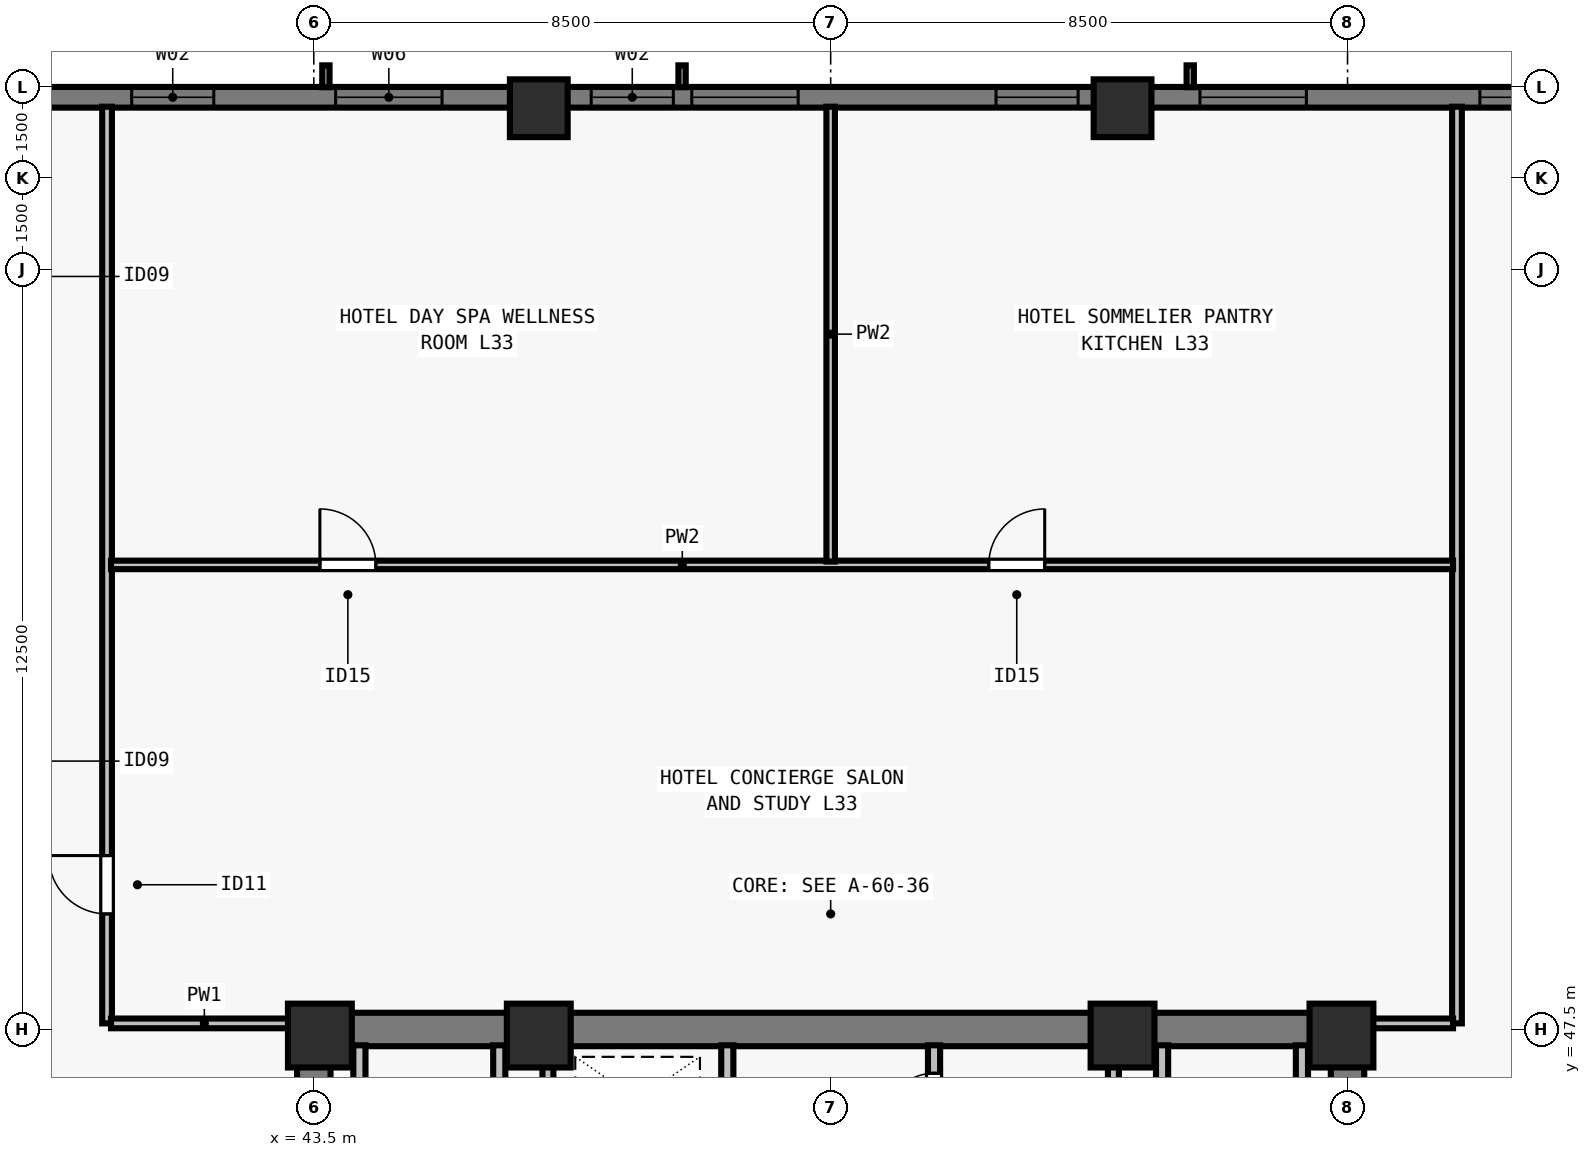
"""IFC4 building model, lengths in metres.
Left out: names, types, materials, properties, quantities, classifications, styles, units other than length and angle.
Written with IfcOpenShell. Run it as: python <this file> out.ifc"""

import sys

from ifc_helpers import new_model, si_unit, direction, frame, frame_2d, origin, origin_2d, place, context, subcontext, project, spatial, rectangle, extrude, element, fill, save


model = new_model("IFC4")
c1 = context("Model", 3, precision=1e-05, world=origin(), true_north=direction((0.0, 1.0)))
c2 = subcontext(c1, "Body", "Model", "MODEL_VIEW")
j1 = project(units=[si_unit("LENGTHUNIT", "METRE"), si_unit("PLANEANGLEUNIT", "RADIAN")], contexts=[c1])
p1 = place(None, origin())
s1 = spatial("IfcSite", under=j1, at=p1, CompositionType="ELEMENT")
p2 = place(p1, origin())
s2 = spatial("IfcBuilding", under=s1, at=p2, CompositionType="ELEMENT")
p3 = place(p2, frame((0.0, 0.0, 123.5)))
s3 = spatial("IfcBuildingStorey", under=s2, at=p3, CompositionType="ELEMENT", Elevation=123.5)
for number, where, z_axis, x_axis in (
    (1, (43.6, 47.4, 0.0), (0.0, 0.0, 1.0), (1.0, 0.0, 0.0)),
    (2, (47.2, 47.4, 0.0), (0.0, 0.0, 1.0), (1.0, 0.0, 0.0)),
    (3, (56.8, 47.4, 0.0), (0.0, 0.0, 1.0), (1.0, 0.0, 0.0)),
    (4, (60.4, 47.4, 0.0), (0.0, 0.0, 1.0), (1.0, 0.0, 0.0)),
):
    element("IfcColumn", number, at=place(p3, frame(where, z_axis=z_axis, x_axis=x_axis)), inside=s3, PredefinedType="COLUMN", context=c2, shape_type="SweptSolid", body=[
        extrude(rectangle(XDim=1.05, YDim=1.05, at=origin_2d()), origin(), (0.0, 0.0, 1.0), 3.5),
    ])
for number, where, z_axis, x_axis in (
    (5, (56.8, 62.65, 0.0), (0.0, 0.0, 1.0), (1.0, 0.0, 0.0)),
    (6, (47.2, 62.65, 0.0), (0.0, 0.0, 1.0), (1.0, 0.0, 0.0)),
):
    element("IfcColumn", number, at=place(p3, frame(where, z_axis=z_axis, x_axis=x_axis)), inside=s3, PredefinedType="COLUMN", context=c2, shape_type="SweptSolid", body=[
        extrude(rectangle(XDim=0.95, YDim=0.95, at=origin_2d()), origin(), (0.0, 0.0, 1.0), 3.5),
    ])
p4 = place(p3, frame((32.0, 62.83, 0.0), z_axis=(0.0, 0.0, 1.0), x_axis=(1.0, 0.0, 0.0)))
e7 = element("IfcWall", 7, at=p4, inside=s3, PredefinedType="SOLIDWALL", context=c2, shape_type="SweptSolid", body=[
    extrude(rectangle(XDim=39.682, YDim=0.34, at=frame_2d((19.841, 0.0))), origin(), (0.0, 0.0, 1.0), 3.28),
])
p5 = place(p4, frame((3.902, 0.0, 0.8)))
e8 = element("IfcOpeningElement", 8, at=p5, cuts=e7, PredefinedType="OPENING", context=c2, shape_type="SweptSolid", body=[
    extrude(rectangle(XDim=1.75, YDim=1.66, at=frame_2d((0.875, 0.83))), frame((0.0, 0.18, 0.0), z_axis=(0.0, -1.0, 0.0), x_axis=(1.0, 0.0, 0.0)), (0.0, 0.0, 1.0), 0.36),
])
p6 = place(p4, frame((8.505, 0.0, 0.8)))
e9 = element("IfcOpeningElement", 9, at=p6, cuts=e7, PredefinedType="OPENING", context=c2, shape_type="SweptSolid", body=[
    extrude(rectangle(XDim=1.35, YDim=1.66, at=frame_2d((0.675, 0.83))), frame((0.0, 0.18, 0.0), z_axis=(0.0, -1.0, 0.0), x_axis=(1.0, 0.0, 0.0)), (0.0, 0.0, 1.0), 0.36),
])
p7 = place(p4, frame((11.859, 0.0, 0.8)))
e10 = element("IfcOpeningElement", 10, at=p7, cuts=e7, PredefinedType="OPENING", context=c2, shape_type="SweptSolid", body=[
    extrude(rectangle(XDim=1.75, YDim=1.66, at=frame_2d((0.875, 0.83))), frame((0.0, 0.18, 0.0), z_axis=(0.0, -1.0, 0.0), x_axis=(1.0, 0.0, 0.0)), (0.0, 0.0, 1.0), 0.36),
])
p8 = place(p4, frame((16.062, 0.0, 0.8)))
e11 = element("IfcOpeningElement", 11, at=p8, cuts=e7, PredefinedType="OPENING", context=c2, shape_type="SweptSolid", body=[
    extrude(rectangle(XDim=1.35, YDim=1.66, at=frame_2d((0.675, 0.83))), frame((0.0, 0.18, 0.0), z_axis=(0.0, -1.0, 0.0), x_axis=(1.0, 0.0, 0.0)), (0.0, 0.0, 1.0), 0.36),
])
p9 = place(p4, frame((17.716, 0.0, 0.8)))
e12 = element("IfcOpeningElement", 12, at=p9, cuts=e7, PredefinedType="OPENING", context=c2, shape_type="SweptSolid", body=[
    extrude(rectangle(XDim=1.75, YDim=1.66, at=frame_2d((0.875, 0.83))), frame((0.0, 0.18, 0.0), z_axis=(0.0, -1.0, 0.0), x_axis=(1.0, 0.0, 0.0)), (0.0, 0.0, 1.0), 0.36),
])
p10 = place(p4, frame((22.719, 0.0, 0.8)))
e13 = element("IfcOpeningElement", 13, at=p10, cuts=e7, PredefinedType="OPENING", context=c2, shape_type="SweptSolid", body=[
    extrude(rectangle(XDim=1.35, YDim=1.66, at=frame_2d((0.675, 0.83))), frame((0.0, 0.18, 0.0), z_axis=(0.0, -1.0, 0.0), x_axis=(1.0, 0.0, 0.0)), (0.0, 0.0, 1.0), 0.36),
])
p11 = place(p4, frame((26.073, 0.0, 0.8)))
e14 = element("IfcOpeningElement", 14, at=p11, cuts=e7, PredefinedType="OPENING", context=c2, shape_type="SweptSolid", body=[
    extrude(rectangle(XDim=1.75, YDim=1.66, at=frame_2d((0.875, 0.83))), frame((0.0, 0.18, 0.0), z_axis=(0.0, -1.0, 0.0), x_axis=(1.0, 0.0, 0.0)), (0.0, 0.0, 1.0), 0.36),
])
p12 = place(p4, frame((30.677, 0.0, 0.8)))
e15 = element("IfcOpeningElement", 15, at=p12, cuts=e7, PredefinedType="OPENING", context=c2, shape_type="SweptSolid", body=[
    extrude(rectangle(XDim=1.35, YDim=1.66, at=frame_2d((0.675, 0.83))), frame((0.0, 0.18, 0.0), z_axis=(0.0, -1.0, 0.0), x_axis=(1.0, 0.0, 0.0)), (0.0, 0.0, 1.0), 0.36),
])
p13 = place(p4, frame((33.18, 0.0, 0.8)))
e16 = element("IfcOpeningElement", 16, at=p13, cuts=e7, PredefinedType="OPENING", context=c2, shape_type="SweptSolid", body=[
    extrude(rectangle(XDim=1.75, YDim=1.66, at=frame_2d((0.875, 0.83))), frame((0.0, 0.18, 0.0), z_axis=(0.0, -1.0, 0.0), x_axis=(1.0, 0.0, 0.0)), (0.0, 0.0, 1.0), 0.36),
])
p14 = place(p3, frame((43.225, 47.5, 0.0), z_axis=(0.0, 0.0, 1.0), x_axis=(1.0, 0.0, 0.0)))
e17 = element("IfcWall", 17, at=p14, inside=s3, PredefinedType="SHEAR", context=c2, shape_type="SweptSolid", body=[
    extrude(rectangle(XDim=17.55, YDim=0.55, at=frame_2d((8.775, 0.0))), origin(), (0.0, 0.0, 1.0), 3.28),
])
for number, where, z_axis, x_axis in (
    (18, (43.5, 40.8, 0.0), (0.0, 0.0, 1.0), (0.0, 1.0, 0.0)),
    (19, (60.5, 40.8, 0.0), (0.0, 0.0, 1.0), (0.0, 1.0, 0.0)),
):
    element("IfcWall", number, at=place(p3, frame(where, z_axis=z_axis, x_axis=x_axis)), inside=s3, PredefinedType="SHEAR", context=c2, shape_type="SweptSolid", body=[
        extrude(rectangle(XDim=6.435, YDim=0.55, at=frame_2d((3.218, 0.0))), origin(), (0.0, 0.0, 1.0), 3.28),
    ])
p15 = place(p3, frame((50.3, 40.585, 0.0), z_axis=(0.0, 0.0, 1.0), x_axis=(0.0, 1.0, 0.0)))
e20 = element("IfcWall", 20, at=p15, inside=s3, PredefinedType="SOLIDWALL", context=c2, shape_type="SweptSolid", body=[
    extrude(rectangle(XDim=6.655, YDim=0.2, at=frame_2d((3.328, 0.0))), origin(), (0.0, 0.0, 1.0), 3.28),
])
p16 = place(p15, frame((5.065, 0.0, 0.0)))
e21 = element("IfcOpeningElement", 21, at=p16, cuts=e20, PredefinedType="OPENING", context=c2, shape_type="SweptSolid", body=[
    extrude(rectangle(XDim=0.8, YDim=2.08, at=frame_2d((0.4, 1.04))), frame((0.0, 0.11, 0.0), z_axis=(0.0, -1.0, 0.0), x_axis=(1.0, 0.0, 0.0)), (0.0, 0.0, 1.0), 0.22),
])
p17 = place(p3, frame((53.7, 40.585, 0.0), z_axis=(0.0, 0.0, 1.0), x_axis=(0.0, 1.0, 0.0)))
e22 = element("IfcWall", 22, at=p17, inside=s3, PredefinedType="SOLIDWALL", context=c2, shape_type="SweptSolid", body=[
    extrude(rectangle(XDim=6.655, YDim=0.2, at=frame_2d((3.328, 0.0))), origin(), (0.0, 0.0, 1.0), 3.28),
])
p18 = place(p17, frame((0.195, 0.0, 0.0)))
e23 = element("IfcOpeningElement", 23, at=p18, cuts=e22, PredefinedType="OPENING", context=c2, shape_type="SweptSolid", body=[
    extrude(rectangle(XDim=0.8, YDim=2.08, at=frame_2d((0.4, 1.04))), frame((0.0, 0.11, 0.0), z_axis=(0.0, -1.0, 0.0), x_axis=(1.0, 0.0, 0.0)), (0.0, 0.0, 1.0), 0.22),
])
p19 = place(p17, frame((3.735, 0.0, 0.0)))
e24 = element("IfcOpeningElement", 24, at=p19, cuts=e22, PredefinedType="OPENING", context=c2, shape_type="SweptSolid", body=[
    extrude(rectangle(XDim=0.9, YDim=2.12, at=frame_2d((0.45, 1.06))), frame((0.0, 0.11, 0.0), z_axis=(0.0, -1.0, 0.0), x_axis=(1.0, 0.0, 0.0)), (0.0, 0.0, 1.0), 0.22),
])
p20 = place(p17, frame((5.395, 0.0, 0.0)))
e25 = element("IfcOpeningElement", 25, at=p20, cuts=e22, PredefinedType="OPENING", context=c2, shape_type="SweptSolid", body=[
    extrude(rectangle(XDim=0.8, YDim=2.1, at=frame_2d((0.4, 1.05))), frame((0.0, 0.11, 0.0), z_axis=(0.0, -1.0, 0.0), x_axis=(1.0, 0.0, 0.0)), (0.0, 0.0, 1.0), 0.22),
])
for number, where, z_axis, x_axis in (
    (26, (46.55, 43.735, 0.0), (0.0, 0.0, 1.0), (0.0, 1.0, 0.0)),
    (27, (44.25, 43.735, 0.0), (0.0, 0.0, 1.0), (0.0, 1.0, 0.0)),
    (28, (57.45, 43.735, 0.0), (0.0, 0.0, 1.0), (0.0, 1.0, 0.0)),
    (29, (59.75, 43.735, 0.0), (0.0, 0.0, 1.0), (0.0, 1.0, 0.0)),
):
    element("IfcWall", number, at=place(p3, frame(where, z_axis=z_axis, x_axis=x_axis)), inside=s3, PredefinedType="SOLIDWALL", context=c2, shape_type="SweptSolid", body=[
        extrude(rectangle(XDim=3.505, YDim=0.2, at=frame_2d((1.752, 0.0))), origin(), (0.0, 0.0, 1.0), 3.28),
    ])
for number, where, z_axis, x_axis in (
    (30, (47.35, 43.735, 0.0), (0.0, 0.0, 1.0), (0.0, 1.0, 0.0)),
    (31, (56.65, 43.735, 0.0), (0.0, 0.0, 1.0), (0.0, 1.0, 0.0)),
):
    element("IfcWall", number, at=place(p3, frame(where, z_axis=z_axis, x_axis=x_axis)), inside=s3, PredefinedType="SOLIDWALL", context=c2, shape_type="SweptSolid", body=[
        extrude(rectangle(XDim=3.505, YDim=0.18, at=frame_2d((1.752, 0.0))), origin(), (0.0, 0.0, 1.0), 3.28),
    ])
p21 = place(p3, frame((40.1, 47.6, 0.0), z_axis=(0.0, 0.0, 1.0), x_axis=(0.0, 1.0, 0.0)))
e32 = element("IfcWall", 32, at=p21, inside=s3, PredefinedType="PARTITIONING", context=c2, shape_type="SweptSolid", body=[
    extrude(rectangle(XDim=15.075, YDim=0.16, at=frame_2d((7.538, 0.0))), origin(), (0.0, 0.0, 1.0), 2.555),
])
p22 = place(p21, frame((1.8, 0.0, 0.0)))
e33 = element("IfcOpeningElement", 33, at=p22, cuts=e32, PredefinedType="OPENING", context=c2, shape_type="SweptSolid", body=[
    extrude(rectangle(XDim=0.96, YDim=2.12, at=frame_2d((0.48, 1.06))), frame((0.0, 0.09, 0.0), z_axis=(0.0, -1.0, 0.0), x_axis=(1.0, 0.0, 0.0)), (0.0, 0.0, 1.0), 0.18),
])
p23 = place(p3, frame((40.165, 47.6, 0.0), z_axis=(0.0, 0.0, 1.0), x_axis=(1.0, 0.0, 0.0)))
e34 = element("IfcWall", 34, at=p23, inside=s3, PredefinedType="PARTITIONING", context=c2, shape_type="SweptSolid", body=[
    extrude(rectangle(XDim=3.07, YDim=0.16, at=frame_2d((1.535, 0.0))), origin(), (0.0, 0.0, 1.0), 3.28),
])
p24 = place(p3, frame((62.3, 47.6, 0.0), z_axis=(0.0, 0.0, 1.0), x_axis=(0.0, 1.0, 0.0)))
e35 = element("IfcWall", 35, at=p24, inside=s3, PredefinedType="PARTITIONING", context=c2, shape_type="SweptSolid", body=[
    extrude(rectangle(XDim=15.075, YDim=0.16, at=frame_2d((7.538, 0.0))), origin(), (0.0, 0.0, 1.0), 2.555),
])
p25 = place(p3, frame((60.765, 47.6, 0.0), z_axis=(0.0, 0.0, 1.0), x_axis=(1.0, 0.0, 0.0)))
e36 = element("IfcWall", 36, at=p25, inside=s3, PredefinedType="PARTITIONING", context=c2, shape_type="SweptSolid", body=[
    extrude(rectangle(XDim=1.47, YDim=0.16, at=frame_2d((0.735, 0.0))), origin(), (0.0, 0.0, 1.0), 3.28),
])
p26 = place(p3, frame((40.165, 55.14, 0.0), z_axis=(0.0, 0.0, 1.0), x_axis=(1.0, 0.0, 0.0)))
e37 = element("IfcWall", 37, at=p26, inside=s3, PredefinedType="PARTITIONING", context=c2, shape_type="SweptSolid", body=[
    extrude(rectangle(XDim=22.07, YDim=0.14, at=frame_2d((11.035, 0.0))), origin(), (0.0, 0.0, 1.0), 3.28),
])
p27 = place(p26, frame((3.435, 0.0, 0.0)))
e38 = element("IfcOpeningElement", 38, at=p27, cuts=e37, PredefinedType="OPENING", context=c2, shape_type="SweptSolid", body=[
    extrude(rectangle(XDim=0.92, YDim=2.12, at=frame_2d((0.46, 1.06))), frame((0.0, 0.08, 0.0), z_axis=(0.0, -1.0, 0.0), x_axis=(1.0, 0.0, 0.0)), (0.0, 0.0, 1.0), 0.16),
])
p28 = place(p26, frame((14.435, 0.0, 0.0)))
e39 = element("IfcOpeningElement", 39, at=p28, cuts=e37, PredefinedType="OPENING", context=c2, shape_type="SweptSolid", body=[
    extrude(rectangle(XDim=0.92, YDim=2.12, at=frame_2d((0.46, 1.06))), frame((0.0, 0.08, 0.0), z_axis=(0.0, -1.0, 0.0), x_axis=(1.0, 0.0, 0.0)), (0.0, 0.0, 1.0), 0.16),
])
p29 = place(p3, frame((52.0, 55.195, 0.0), z_axis=(0.0, 0.0, 1.0), x_axis=(0.0, 1.0, 0.0)))
e40 = element("IfcWall", 40, at=p29, inside=s3, PredefinedType="PARTITIONING", context=c2, shape_type="SweptSolid", body=[
    extrude(rectangle(XDim=7.48, YDim=0.14, at=frame_2d((3.74, 0.0))), origin(), (0.0, 0.0, 1.0), 3.28),
])
p30 = place(p6, origin())
e41 = element("IfcWindow", 41, at=p30, inside=s3, PartitioningType="SINGLE_PANEL", PredefinedType="WINDOW", context=c2, shape_type="SweptSolid", body=[
    extrude(rectangle(XDim=1.35, YDim=1.66, at=frame_2d((0.675, 0.83))), frame((0.0, -0.05, 0.0), z_axis=(0.0, -1.0, 0.0), x_axis=(1.0, 0.0, 0.0)), (0.0, 0.0, 1.0), 0.06),
])
fill(e9, e41)
p31 = place(p7, origin())
e42 = element("IfcWindow", 42, at=p31, inside=s3, PartitioningType="SINGLE_PANEL", PredefinedType="WINDOW", context=c2, shape_type="SweptSolid", body=[
    extrude(rectangle(XDim=1.75, YDim=1.66, at=frame_2d((0.875, 0.83))), frame((0.0, -0.05, 0.0), z_axis=(0.0, -1.0, 0.0), x_axis=(1.0, 0.0, 0.0)), (0.0, 0.0, 1.0), 0.06),
])
fill(e10, e42)
p32 = place(p8, origin())
e43 = element("IfcWindow", 43, at=p32, inside=s3, PartitioningType="SINGLE_PANEL", PredefinedType="WINDOW", context=c2, shape_type="SweptSolid", body=[
    extrude(rectangle(XDim=1.35, YDim=1.66, at=frame_2d((0.675, 0.83))), frame((0.0, -0.05, 0.0), z_axis=(0.0, -1.0, 0.0), x_axis=(1.0, 0.0, 0.0)), (0.0, 0.0, 1.0), 0.06),
])
fill(e11, e43)
p33 = place(p9, origin())
e44 = element("IfcWindow", 44, at=p33, inside=s3, PartitioningType="SINGLE_PANEL", PredefinedType="WINDOW", context=c2, shape_type="SweptSolid", body=[
    extrude(rectangle(XDim=1.75, YDim=1.66, at=frame_2d((0.875, 0.83))), frame((0.0, -0.05, 0.0), z_axis=(0.0, -1.0, 0.0), x_axis=(1.0, 0.0, 0.0)), (0.0, 0.0, 1.0), 0.06),
])
fill(e12, e44)
p34 = place(p10, origin())
e45 = element("IfcWindow", 45, at=p34, inside=s3, PartitioningType="SINGLE_PANEL", PredefinedType="WINDOW", context=c2, shape_type="SweptSolid", body=[
    extrude(rectangle(XDim=1.35, YDim=1.66, at=frame_2d((0.675, 0.83))), frame((0.0, -0.05, 0.0), z_axis=(0.0, -1.0, 0.0), x_axis=(1.0, 0.0, 0.0)), (0.0, 0.0, 1.0), 0.06),
])
fill(e13, e45)
p35 = place(p11, origin())
e46 = element("IfcWindow", 46, at=p35, inside=s3, PartitioningType="SINGLE_PANEL", PredefinedType="WINDOW", context=c2, shape_type="SweptSolid", body=[
    extrude(rectangle(XDim=1.75, YDim=1.66, at=frame_2d((0.875, 0.83))), frame((0.0, -0.05, 0.0), z_axis=(0.0, -1.0, 0.0), x_axis=(1.0, 0.0, 0.0)), (0.0, 0.0, 1.0), 0.06),
])
fill(e14, e46)
p36 = place(p12, origin())
e47 = element("IfcWindow", 47, at=p36, inside=s3, PartitioningType="SINGLE_PANEL", PredefinedType="WINDOW", context=c2, shape_type="SweptSolid", body=[
    extrude(rectangle(XDim=1.35, YDim=1.66, at=frame_2d((0.675, 0.83))), frame((0.0, -0.05, 0.0), z_axis=(0.0, -1.0, 0.0), x_axis=(1.0, 0.0, 0.0)), (0.0, 0.0, 1.0), 0.06),
])
fill(e15, e47)
p37 = place(p20, origin())
e48 = element("IfcDoor", 48, at=p37, inside=s3, OperationType="SINGLE_SWING_LEFT", PredefinedType="DOOR", context=c2, shape_type="SweptSolid", body=[
    extrude(rectangle(XDim=0.8, YDim=2.1, at=frame_2d((0.4, 1.05))), frame((0.0, 0.025, 0.0), z_axis=(0.0, -1.0, 0.0), x_axis=(1.0, 0.0, 0.0)), (0.0, 0.0, 1.0), 0.05),
])
fill(e25, e48)
p38 = place(p22, origin())
e49 = element("IfcDoor", 49, at=p38, inside=s3, OperationType="SINGLE_SWING_RIGHT", PredefinedType="DOOR", context=c2, shape_type="SweptSolid", body=[
    extrude(rectangle(XDim=0.96, YDim=2.12, at=frame_2d((0.48, 1.06))), frame((0.0, 0.025, 0.0), z_axis=(0.0, -1.0, 0.0), x_axis=(1.0, 0.0, 0.0)), (0.0, 0.0, 1.0), 0.05),
])
fill(e33, e49)
p39 = place(p27, origin())
e50 = element("IfcDoor", 50, at=p39, inside=s3, OperationType="SINGLE_SWING_LEFT", PredefinedType="DOOR", context=c2, shape_type="SweptSolid", body=[
    extrude(rectangle(XDim=0.92, YDim=2.12, at=frame_2d((0.46, 1.06))), frame((0.0, 0.025, 0.0), z_axis=(0.0, -1.0, 0.0), x_axis=(1.0, 0.0, 0.0)), (0.0, 0.0, 1.0), 0.05),
])
fill(e38, e50)
p40 = place(p28, origin())
e51 = element("IfcDoor", 51, at=p40, inside=s3, OperationType="SINGLE_SWING_RIGHT", PredefinedType="DOOR", context=c2, shape_type="SweptSolid", body=[
    extrude(rectangle(XDim=0.92, YDim=2.12, at=frame_2d((0.46, 1.06))), frame((0.0, 0.025, 0.0), z_axis=(0.0, -1.0, 0.0), x_axis=(1.0, 0.0, 0.0)), (0.0, 0.0, 1.0), 0.05),
])
fill(e39, e51)
save(model, sys.argv[1])
